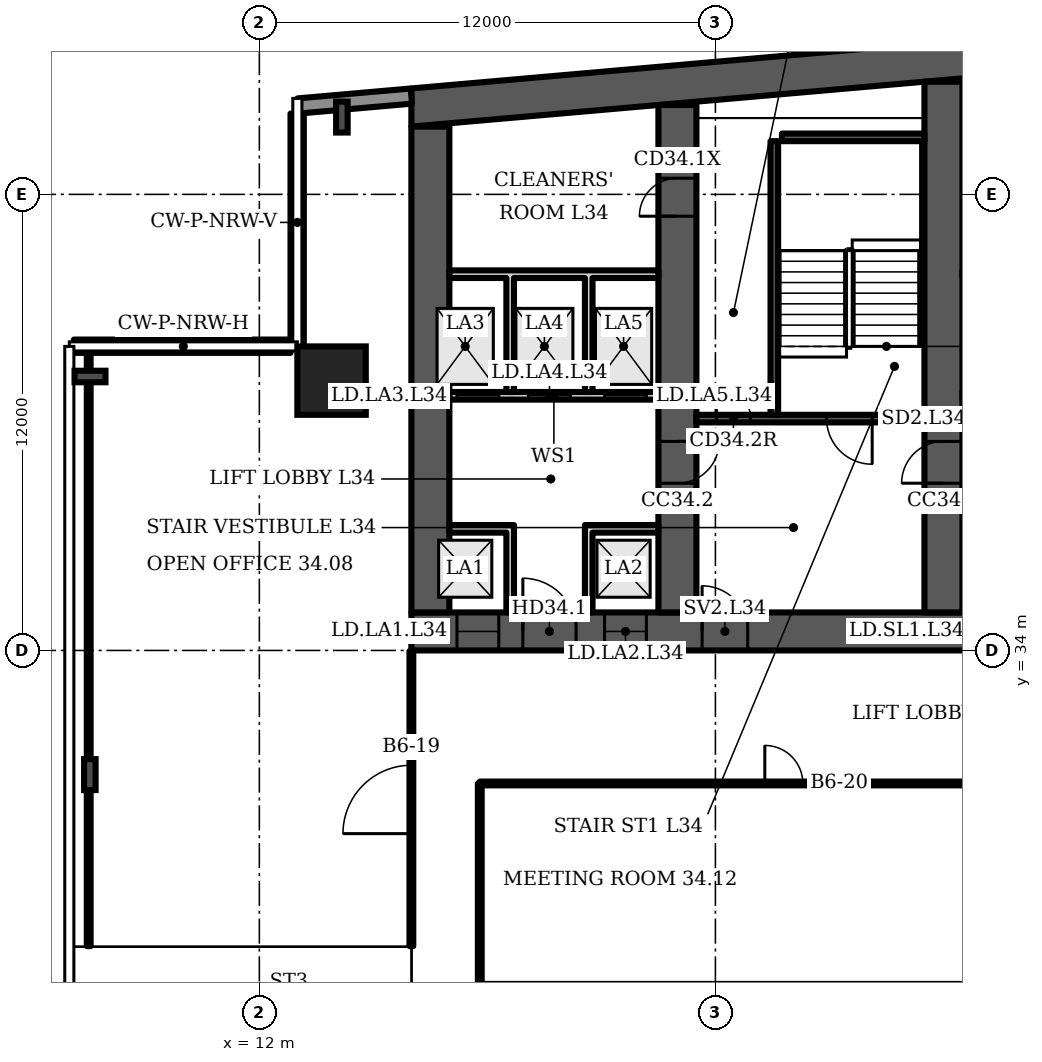
"""IFC4 building model, lengths in metres.
Left out: names, types, materials, properties, quantities, classifications, styles, units other than length and angle.
Written with IfcOpenShell. Run it as: python <this file> out.ifc"""

import sys

from ifc_helpers import new_model, si_unit, direction, frame, frame_2d, origin, origin_2d, place, context, subcontext, project, spatial, polyline, rectangle, i_section, outline, extrude, element, fill, save


model = new_model("IFC4")
c1 = context("Model", 3, precision=1e-05, world=origin(), true_north=direction((0.0, 1.0)))
c2 = subcontext(c1, "Body", "Model", "MODEL_VIEW")
j1 = project(units=[si_unit("LENGTHUNIT", "METRE"), si_unit("PLANEANGLEUNIT", "RADIAN")], contexts=[c1])
p1 = place(None, origin())
s1 = spatial("IfcSite", under=j1, at=p1, CompositionType="ELEMENT")
p2 = place(p1, origin())
s2 = spatial("IfcBuilding", under=s1, at=p2, CompositionType="ELEMENT")
p3 = place(p2, frame((0.0, 0.0, 143.5)))
s3 = spatial("IfcBuildingStorey", under=s2, at=p3, CompositionType="ELEMENT", Elevation=143.5)
p4 = place(p3, origin())
e1 = element("IfcWall", 1, at=p4, inside=s3, PredefinedType="SHEAR", context=c2, shape_type="SweptSolid", body=[
    extrude(outline(polyline([(16.0, 47.784), (40.5, 49.927), (65.0, 47.784), (65.0, 48.787), (40.5, 50.931), (16.0, 48.787), (16.0, 47.784)])), origin(), (0.0, 0.0, 1.0), 3.6),
])
p5 = place(p3, frame((16.0, 34.5, 0.0), z_axis=(0.0, 0.0, 1.0), x_axis=(1.0, 0.0, 0.0)))
e2 = element("IfcWall", 2, at=p5, inside=s3, PredefinedType="SHEAR", context=c2, shape_type="SweptSolid", body=[
    extrude(rectangle(XDim=49.0, YDim=1.0, at=frame_2d((24.5, 0.0))), origin(), (0.0, 0.0, 1.0), 3.6),
])
p6 = place(p5, frame((1.2, 0.0, 0.0)))
e3 = element("IfcOpeningElement", 3, at=p6, cuts=e2, PredefinedType="OPENING", context=c2, shape_type="SweptSolid", body=[
    extrude(rectangle(XDim=1.1, YDim=2.1, at=frame_2d((0.55, 1.05))), frame((0.0, 0.51, 0.0), z_axis=(0.0, -1.0, 0.0), x_axis=(1.0, 0.0, 0.0)), (0.0, 0.0, 1.0), 1.02),
])
p7 = place(p5, frame((5.083, 0.0, 0.0)))
e4 = element("IfcOpeningElement", 4, at=p7, cuts=e2, PredefinedType="OPENING", context=c2, shape_type="SweptSolid", body=[
    extrude(rectangle(XDim=1.1, YDim=2.1, at=frame_2d((0.55, 1.05))), frame((0.0, 0.51, 0.0), z_axis=(0.0, -1.0, 0.0), x_axis=(1.0, 0.0, 0.0)), (0.0, 0.0, 1.0), 1.02),
])
p8 = place(p5, frame((2.933, 0.0, 0.0)))
e5 = element("IfcOpeningElement", 5, at=p8, cuts=e2, PredefinedType="OPENING", context=c2, shape_type="SweptSolid", body=[
    extrude(rectangle(XDim=1.4, YDim=2.1, at=frame_2d((0.7, 1.05))), frame((0.0, 0.51, 0.0), z_axis=(0.0, -1.0, 0.0), x_axis=(1.0, 0.0, 0.0)), (0.0, 0.0, 1.0), 1.02),
])
p9 = place(p5, frame((7.65, 0.0, 0.0)))
e6 = element("IfcOpeningElement", 6, at=p9, cuts=e2, PredefinedType="OPENING", context=c2, shape_type="SweptSolid", body=[
    extrude(rectangle(XDim=1.2, YDim=2.1, at=frame_2d((0.6, 1.05))), frame((0.0, 0.51, 0.0), z_axis=(0.0, -1.0, 0.0), x_axis=(1.0, 0.0, 0.0)), (0.0, 0.0, 1.0), 1.02),
])
p10 = place(p5, frame((14.817, 0.0, 0.0)))
e7 = element("IfcOpeningElement", 7, at=p10, cuts=e2, PredefinedType="OPENING", context=c2, shape_type="SweptSolid", body=[
    extrude(rectangle(XDim=1.1, YDim=2.1, at=frame_2d((0.55, 1.05))), frame((0.0, 0.51, 0.0), z_axis=(0.0, -1.0, 0.0), x_axis=(1.0, 0.0, 0.0)), (0.0, 0.0, 1.0), 1.02),
])
p11 = place(p5, frame((19.083, 0.0, 0.0)))
e8 = element("IfcOpeningElement", 8, at=p11, cuts=e2, PredefinedType="OPENING", context=c2, shape_type="SweptSolid", body=[
    extrude(rectangle(XDim=1.1, YDim=2.1, at=frame_2d((0.55, 1.05))), frame((0.0, 0.51, 0.0), z_axis=(0.0, -1.0, 0.0), x_axis=(1.0, 0.0, 0.0)), (0.0, 0.0, 1.0), 1.02),
])
p12 = place(p5, frame((16.8, 0.0, 0.0)))
e9 = element("IfcOpeningElement", 9, at=p12, cuts=e2, PredefinedType="OPENING", context=c2, shape_type="SweptSolid", body=[
    extrude(rectangle(XDim=1.4, YDim=2.1, at=frame_2d((0.7, 1.05))), frame((0.0, 0.51, 0.0), z_axis=(0.0, -1.0, 0.0), x_axis=(1.0, 0.0, 0.0)), (0.0, 0.0, 1.0), 1.02),
])
p13 = place(p5, frame((21.817, 0.0, 0.0)))
e10 = element("IfcOpeningElement", 10, at=p13, cuts=e2, PredefinedType="OPENING", context=c2, shape_type="SweptSolid", body=[
    extrude(rectangle(XDim=1.1, YDim=2.1, at=frame_2d((0.55, 1.05))), frame((0.0, 0.51, 0.0), z_axis=(0.0, -1.0, 0.0), x_axis=(1.0, 0.0, 0.0)), (0.0, 0.0, 1.0), 1.02),
])
p14 = place(p5, frame((26.083, 0.0, 0.0)))
e11 = element("IfcOpeningElement", 11, at=p14, cuts=e2, PredefinedType="OPENING", context=c2, shape_type="SweptSolid", body=[
    extrude(rectangle(XDim=1.1, YDim=2.1, at=frame_2d((0.55, 1.05))), frame((0.0, 0.51, 0.0), z_axis=(0.0, -1.0, 0.0), x_axis=(1.0, 0.0, 0.0)), (0.0, 0.0, 1.0), 1.02),
])
p15 = place(p5, frame((33.15, 0.0, 0.0)))
e12 = element("IfcOpeningElement", 12, at=p15, cuts=e2, PredefinedType="OPENING", context=c2, shape_type="SweptSolid", body=[
    extrude(rectangle(XDim=1.2, YDim=2.1, at=frame_2d((0.6, 1.05))), frame((0.0, 0.51, 0.0), z_axis=(0.0, -1.0, 0.0), x_axis=(1.0, 0.0, 0.0)), (0.0, 0.0, 1.0), 1.02),
])
p16 = place(p5, frame((37.8, 0.0, 0.0)))
e13 = element("IfcOpeningElement", 13, at=p16, cuts=e2, PredefinedType="OPENING", context=c2, shape_type="SweptSolid", body=[
    extrude(rectangle(XDim=1.4, YDim=2.1, at=frame_2d((0.7, 1.05))), frame((0.0, 0.51, 0.0), z_axis=(0.0, -1.0, 0.0), x_axis=(1.0, 0.0, 0.0)), (0.0, 0.0, 1.0), 1.02),
])
p17 = place(p5, frame((42.817, 0.0, 0.0)))
e14 = element("IfcOpeningElement", 14, at=p17, cuts=e2, PredefinedType="OPENING", context=c2, shape_type="SweptSolid", body=[
    extrude(rectangle(XDim=1.1, YDim=2.1, at=frame_2d((0.55, 1.05))), frame((0.0, 0.51, 0.0), z_axis=(0.0, -1.0, 0.0), x_axis=(1.0, 0.0, 0.0)), (0.0, 0.0, 1.0), 1.02),
])
p18 = place(p5, frame((46.7, 0.0, 0.0)))
e15 = element("IfcOpeningElement", 15, at=p18, cuts=e2, PredefinedType="OPENING", context=c2, shape_type="SweptSolid", body=[
    extrude(rectangle(XDim=1.1, YDim=2.1, at=frame_2d((0.55, 1.05))), frame((0.0, 0.51, 0.0), z_axis=(0.0, -1.0, 0.0), x_axis=(1.0, 0.0, 0.0)), (0.0, 0.0, 1.0), 1.02),
])
p19 = place(p5, frame((44.667, 0.0, 0.0)))
e16 = element("IfcOpeningElement", 16, at=p19, cuts=e2, PredefinedType="OPENING", context=c2, shape_type="SweptSolid", body=[
    extrude(rectangle(XDim=1.4, YDim=2.1, at=frame_2d((0.7, 1.05))), frame((0.0, 0.51, 0.0), z_axis=(0.0, -1.0, 0.0), x_axis=(1.0, 0.0, 0.0)), (0.0, 0.0, 1.0), 1.02),
])
p20 = place(p3, frame((16.5, 35.0, 0.0), z_axis=(0.0, 0.0, 1.0), x_axis=(0.0, 1.0, 0.0)))
e17 = element("IfcWall", 17, at=p20, inside=s3, PredefinedType="SHEAR", context=c2, shape_type="SweptSolid", body=[
    extrude(rectangle(XDim=12.784, YDim=1.0, at=frame_2d((6.392, 0.0))), origin(), (0.0, 0.0, 1.0), 3.6),
])
p21 = place(p3, frame((23.0, 35.0, 0.0), z_axis=(0.0, 0.0, 1.0), x_axis=(0.0, 1.0, 0.0)))
e18 = element("IfcWall", 18, at=p21, inside=s3, PredefinedType="SHEAR", context=c2, shape_type="SweptSolid", body=[
    extrude(rectangle(XDim=13.352, YDim=1.0, at=frame_2d((6.676, 0.0))), origin(), (0.0, 0.0, 1.0), 3.6),
])
p22 = place(p21, frame((10.426, 0.0, 0.0)))
e19 = element("IfcOpeningElement", 19, at=p22, cuts=e18, PredefinedType="OPENING", context=c2, shape_type="SweptSolid", body=[
    extrude(rectangle(XDim=1.0, YDim=2.1, at=frame_2d((0.5, 1.05))), frame((0.0, 0.51, 0.0), z_axis=(0.0, -1.0, 0.0), x_axis=(1.0, 0.0, 0.0)), (0.0, 0.0, 1.0), 1.02),
])
p23 = place(p21, frame((3.4, 0.0, 0.0)))
e20 = element("IfcOpeningElement", 20, at=p23, cuts=e18, PredefinedType="OPENING", context=c2, shape_type="SweptSolid", body=[
    extrude(rectangle(XDim=1.1, YDim=2.1, at=frame_2d((0.55, 1.05))), frame((0.0, 0.51, 0.0), z_axis=(0.0, -1.0, 0.0), x_axis=(1.0, 0.0, 0.0)), (0.0, 0.0, 1.0), 1.02),
])
p24 = place(p3, frame((30.0, 35.0, 0.0), z_axis=(0.0, 0.0, 1.0), x_axis=(0.0, 1.0, 0.0)))
e21 = element("IfcWall", 21, at=p24, inside=s3, PredefinedType="SHEAR", context=c2, shape_type="SweptSolid", body=[
    extrude(rectangle(XDim=13.965, YDim=1.0, at=frame_2d((6.982, 0.0))), origin(), (0.0, 0.0, 1.0), 3.6),
])
p25 = place(p24, frame((3.4, 0.0, 0.0)))
e22 = element("IfcOpeningElement", 22, at=p25, cuts=e21, PredefinedType="OPENING", context=c2, shape_type="SweptSolid", body=[
    extrude(rectangle(XDim=1.1, YDim=2.1, at=frame_2d((0.55, 1.05))), frame((0.0, 0.51, 0.0), z_axis=(0.0, -1.0, 0.0), x_axis=(1.0, 0.0, 0.0)), (0.0, 0.0, 1.0), 1.02),
])
p26 = place(p3, frame((13.9, 41.1, 0.0), z_axis=(0.0, 0.0, 1.0), x_axis=(1.0, 0.0, 0.0)))
e23 = element("IfcColumn", 23, at=p26, inside=s3, PredefinedType="COLUMN", context=c2, shape_type="SweptSolid", body=[
    extrude(rectangle(XDim=1.8, YDim=1.8, at=origin_2d()), origin(), (0.0, 0.0, 1.0), 3.6),
])
for number, where, z_axis, x_axis in (
    (24, (14.172, 48.034, 0.0), (0.0, 0.0, 1.0), (-1.0, 0.0, 0.0)),
    (25, (7.544, 41.208, 0.0), (0.0, 0.0, 1.0), (0.0, 1.0, 0.0)),
    (26, (7.54, 30.733, 0.0), (0.0, 0.0, 1.0), (-1.0, 0.0, 0.0)),
):
    element("IfcColumn", number, at=place(p3, frame(where, z_axis=z_axis, x_axis=x_axis)), inside=s3, PredefinedType="COLUMN", context=c2, shape_type="SweptSolid", body=[
        extrude(i_section(OverallWidth=0.303, OverallDepth=0.814, WebThickness=0.021, FlangeThickness=0.04, FilletRadius=0.03, at=origin_2d()), origin(), (0.0, 0.0, 1.0), 3.6),
    ])
p27 = place(p3, frame((16.0, 48.587, 0.0), z_axis=(0.0, 0.0, 1.0), x_axis=(-0.996194, -0.087168, 0.0)))
e27 = element("IfcWall", 27, at=p27, inside=s3, PredefinedType="SOLIDWALL", context=c2, shape_type="SweptSolid", body=[
    extrude(rectangle(XDim=2.994, YDim=0.4, at=frame_2d((1.497, 0.0))), origin(), (0.0, 0.0, 1.0), 3.15),
])
p28 = place(p3, frame((12.995, 48.126, 0.0), z_axis=(0.0, 0.0, 1.0), x_axis=(0.0, -1.0, 0.0)))
e28 = element("IfcWall", 28, at=p28, inside=s3, PredefinedType="SOLIDWALL", context=c2, shape_type="SweptSolid", body=[
    extrude(rectangle(XDim=6.126, YDim=0.35, at=frame_2d((3.063, 0.0))), origin(), (0.0, 0.0, 1.0), 1.0),
])
p29 = place(p3, frame((12.82, 42.005, 0.0), z_axis=(0.0, 0.0, 1.0), x_axis=(-1.0, 0.0, 0.0)))
e29 = element("IfcWall", 29, at=p29, inside=s3, PredefinedType="SOLIDWALL", context=c2, shape_type="SweptSolid", body=[
    extrude(rectangle(XDim=5.7, YDim=0.35, at=frame_2d((2.85, 0.0))), origin(), (0.0, 0.0, 1.0), 1.0),
])
p30 = place(p3, frame((17.0, 40.7, 0.0), z_axis=(0.0, 0.0, 1.0), x_axis=(1.0, 0.0, 0.0)))
e30 = element("IfcWall", 30, at=p30, inside=s3, PredefinedType="PARTITIONING", context=c2, shape_type="SweptSolid", body=[
    extrude(rectangle(XDim=5.5, YDim=0.2, at=frame_2d((2.75, 0.0))), origin(), (0.0, 0.0, 1.0), 3.15),
])
p31 = place(p30, frame((0.2, 0.0, 0.0)))
e31 = element("IfcOpeningElement", 31, at=p31, cuts=e30, PredefinedType="OPENING", context=c2, shape_type="SweptSolid", body=[
    extrude(rectangle(XDim=1.1, YDim=2.1, at=frame_2d((0.55, 1.05))), frame((0.0, 0.11, 0.0), z_axis=(0.0, -1.0, 0.0), x_axis=(1.0, 0.0, 0.0)), (0.0, 0.0, 1.0), 0.22),
])
p32 = place(p30, frame((2.083, 0.0, 0.0)))
e32 = element("IfcOpeningElement", 32, at=p32, cuts=e30, PredefinedType="OPENING", context=c2, shape_type="SweptSolid", body=[
    extrude(rectangle(XDim=1.1, YDim=2.1, at=frame_2d((0.55, 1.05))), frame((0.0, 0.11, 0.0), z_axis=(0.0, -1.0, 0.0), x_axis=(1.0, 0.0, 0.0)), (0.0, 0.0, 1.0), 0.22),
])
p33 = place(p30, frame((4.083, 0.0, 0.0)))
e33 = element("IfcOpeningElement", 33, at=p33, cuts=e30, PredefinedType="OPENING", context=c2, shape_type="SweptSolid", body=[
    extrude(rectangle(XDim=1.1, YDim=2.1, at=frame_2d((0.55, 1.05))), frame((0.0, 0.11, 0.0), z_axis=(0.0, -1.0, 0.0), x_axis=(1.0, 0.0, 0.0)), (0.0, 0.0, 1.0), 0.22),
])
p34 = place(p3, frame((0.0, 0.0, -0.0)))
e34 = element("IfcWall", 34, at=p34, inside=s3, PredefinedType="PARTITIONING", context=c2, shape_type="SweptSolid", body=[
    extrude(outline(polyline([(18.5, 37.1), (17.0, 37.1), (17.0, 37.3), (18.5, 37.3), (18.7, 37.3), (18.7, 35.0), (18.5, 35.0), (18.5, 37.1)])), origin(), (0.0, 0.0, 1.0), 3.15),
])
p35 = place(p3, frame((0.0, 0.0, -0.0)))
e35 = element("IfcWall", 35, at=p35, inside=s3, PredefinedType="PARTITIONING", context=c2, shape_type="SweptSolid", body=[
    extrude(outline(polyline([(20.567, 37.3), (20.767, 37.3), (22.5, 37.3), (22.5, 37.1), (20.767, 37.1), (20.767, 35.0), (20.567, 35.0), (20.567, 37.3)])), origin(), (0.0, 0.0, 1.0), 3.15),
])
p36 = place(p3, frame((0.0, 0.0, -0.0)))
e36 = element("IfcWall", 36, at=p36, inside=s3, PredefinedType="PARTITIONING", context=c2, shape_type="SweptSolid", body=[
    extrude(outline(polyline([(18.7, 40.8), (18.5, 40.8), (18.5, 43.8), (17.0, 43.8), (17.0, 44.0), (22.5, 44.0), (22.5, 43.8), (20.767, 43.8), (20.767, 40.8), (20.567, 40.8), (20.567, 43.8), (18.7, 43.8), (18.7, 40.8)])), origin(), (0.0, 0.0, 1.0), 3.15),
])
p37 = place(p3, frame((23.5, 40.1, 0.0), z_axis=(0.0, 0.0, 1.0), x_axis=(1.0, 0.0, 0.0)))
e37 = element("IfcWall", 37, at=p37, inside=s3, PredefinedType="SHEAR", context=c2, shape_type="SweptSolid", body=[
    extrude(rectangle(XDim=6.0, YDim=0.2, at=frame_2d((3.0, 0.0))), origin(), (0.0, 0.0, 1.0), 3.15),
])
p38 = place(p37, frame((3.425, 0.0, 0.0)))
e38 = element("IfcOpeningElement", 38, at=p38, cuts=e37, PredefinedType="OPENING", context=c2, shape_type="SweptSolid", body=[
    extrude(rectangle(XDim=1.2, YDim=2.1, at=frame_2d((0.6, 1.05))), frame((0.0, 0.11, 0.0), z_axis=(0.0, -1.0, 0.0), x_axis=(1.0, 0.0, 0.0)), (0.0, 0.0, 1.0), 0.22),
])
p39 = place(p37, frame((0.525, 0.0, 0.0)))
e39 = element("IfcOpeningElement", 39, at=p39, cuts=e37, PredefinedType="OPENING", context=c2, shape_type="SweptSolid", body=[
    extrude(rectangle(XDim=0.9, YDim=2.1, at=frame_2d((0.45, 1.05))), frame((0.0, 0.11, 0.0), z_axis=(0.0, -1.0, 0.0), x_axis=(1.0, 0.0, 0.0)), (0.0, 0.0, 1.0), 0.22),
])
p40 = place(p3, frame((25.55, 40.2, 0.0), z_axis=(0.0, 0.0, 1.0), x_axis=(0.0, 1.0, 0.0)))
e40 = element("IfcWall", 40, at=p40, inside=s3, PredefinedType="SHEAR", context=c2, shape_type="SweptSolid", body=[
    extrude(rectangle(XDim=7.2, YDim=0.2, at=frame_2d((3.6, 0.0))), origin(), (0.0, 0.0, 1.0), 3.15),
])
p41 = place(p3, frame((25.75, 47.5, 0.0), z_axis=(0.0, 0.0, 1.0), x_axis=(1.0, 0.0, 0.0)))
e41 = element("IfcWall", 41, at=p41, inside=s3, PredefinedType="SHEAR", context=c2, shape_type="SweptSolid", body=[
    extrude(rectangle(XDim=3.75, YDim=0.2, at=frame_2d((1.875, 0.0))), origin(), (0.0, 0.0, 1.0), 3.15),
])
p42 = place(p3, frame((7.51, 26.22, 0.0), z_axis=(0.0, 0.0, 1.0), x_axis=(0.0, 1.0, 0.0)))
e42 = element("IfcWall", 42, at=p42, inside=s3, PredefinedType="PARTITIONING", context=c2, shape_type="SweptSolid", body=[
    extrude(rectangle(XDim=15.76, YDim=0.1, at=frame_2d((7.88, 0.0))), origin(), (0.0, 0.0, 1.0), 2.53),
])
p43 = place(p3, frame((16.0, 26.22, 0.0), z_axis=(0.0, 0.0, 1.0), x_axis=(0.0, 1.0, 0.0)))
e43 = element("IfcWall", 43, at=p43, inside=s3, PredefinedType="PARTITIONING", context=c2, shape_type="SweptSolid", body=[
    extrude(rectangle(XDim=7.76, YDim=0.1, at=frame_2d((3.88, 0.0))), origin(), (0.0, 0.0, 1.0), 3.15),
])
p44 = place(p43, frame((2.96, 0.0, 0.0)))
e44 = element("IfcOpeningElement", 44, at=p44, cuts=e43, PredefinedType="OPENING", context=c2, shape_type="SweptSolid", body=[
    extrude(rectangle(XDim=1.8, YDim=2.1, at=frame_2d((0.9, 1.05))), frame((0.0, 0.06, 0.0), z_axis=(0.0, -1.0, 0.0), x_axis=(1.0, 0.0, 0.0)), (0.0, 0.0, 1.0), 0.12),
])
p45 = place(p3, frame((17.8, 23.935, 0.0), z_axis=(0.0, 0.0, 1.0), x_axis=(0.0, 1.0, 0.0)))
e45 = element("IfcWall", 45, at=p45, inside=s3, PredefinedType="PARTITIONING", context=c2, shape_type="SweptSolid", body=[
    extrude(rectangle(XDim=6.565, YDim=0.1, at=frame_2d((3.282, 0.0))), origin(), (0.0, 0.0, 1.0), 3.15),
])
p46 = place(p3, frame((17.8, 30.5, 0.0), z_axis=(0.0, 0.0, 1.0), x_axis=(1.0, 0.0, 0.0)))
e46 = element("IfcWall", 46, at=p46, inside=s3, PredefinedType="PARTITIONING", context=c2, shape_type="SweptSolid", body=[
    extrude(rectangle(XDim=19.05, YDim=0.1, at=frame_2d((9.525, 0.0))), origin(), (0.0, 0.0, 1.0), 3.15),
])
p47 = place(p46, frame((7.5, 0.0, 0.0)))
e47 = element("IfcOpeningElement", 47, at=p47, cuts=e46, PredefinedType="OPENING", context=c2, shape_type="SweptSolid", body=[
    extrude(rectangle(XDim=1.0, YDim=2.1, at=frame_2d((0.5, 1.05))), frame((0.0, 0.06, 0.0), z_axis=(0.0, -1.0, 0.0), x_axis=(1.0, 0.0, 0.0)), (0.0, 0.0, 1.0), 0.12),
])
p48 = place(p6, origin())
e48 = element("IfcDoor", 48, at=p48, inside=s3, OperationType="DOUBLE_DOOR_SLIDING", PredefinedType="DOOR", context=c2, shape_type="SweptSolid", body=[
    extrude(rectangle(XDim=1.1, YDim=2.1, at=frame_2d((0.55, 1.05))), frame((0.0, 0.025, 0.0), z_axis=(0.0, -1.0, 0.0), x_axis=(1.0, 0.0, 0.0)), (0.0, 0.0, 1.0), 0.05),
])
fill(e3, e48)
p49 = place(p7, origin())
e49 = element("IfcDoor", 49, at=p49, inside=s3, OperationType="DOUBLE_DOOR_SLIDING", PredefinedType="DOOR", context=c2, shape_type="SweptSolid", body=[
    extrude(rectangle(XDim=1.1, YDim=2.1, at=frame_2d((0.55, 1.05))), frame((0.0, 0.025, 0.0), z_axis=(0.0, -1.0, 0.0), x_axis=(1.0, 0.0, 0.0)), (0.0, 0.0, 1.0), 0.05),
])
fill(e4, e49)
p50 = place(p8, origin())
e50 = element("IfcDoor", 50, at=p50, inside=s3, OperationType="DOUBLE_DOOR_SINGLE_SWING", PredefinedType="DOOR", context=c2, shape_type="SweptSolid", body=[
    extrude(rectangle(XDim=1.4, YDim=2.1, at=frame_2d((0.7, 1.05))), frame((0.0, 0.025, 0.0), z_axis=(0.0, -1.0, 0.0), x_axis=(1.0, 0.0, 0.0)), (0.0, 0.0, 1.0), 0.05),
])
fill(e5, e50)
p51 = place(p31, origin())
e51 = element("IfcDoor", 51, at=p51, inside=s3, OperationType="DOUBLE_DOOR_SLIDING", PredefinedType="DOOR", context=c2, shape_type="SweptSolid", body=[
    extrude(rectangle(XDim=1.1, YDim=2.1, at=frame_2d((0.55, 1.05))), frame((0.0, 0.025, 0.0), z_axis=(0.0, -1.0, 0.0), x_axis=(1.0, 0.0, 0.0)), (0.0, 0.0, 1.0), 0.05),
])
fill(e31, e51)
p52 = place(p32, origin())
e52 = element("IfcDoor", 52, at=p52, inside=s3, OperationType="DOUBLE_DOOR_SLIDING", PredefinedType="DOOR", context=c2, shape_type="SweptSolid", body=[
    extrude(rectangle(XDim=1.1, YDim=2.1, at=frame_2d((0.55, 1.05))), frame((0.0, 0.025, 0.0), z_axis=(0.0, -1.0, 0.0), x_axis=(1.0, 0.0, 0.0)), (0.0, 0.0, 1.0), 0.05),
])
fill(e32, e52)
p53 = place(p33, origin())
e53 = element("IfcDoor", 53, at=p53, inside=s3, OperationType="DOUBLE_DOOR_SLIDING", PredefinedType="DOOR", context=c2, shape_type="SweptSolid", body=[
    extrude(rectangle(XDim=1.1, YDim=2.1, at=frame_2d((0.55, 1.05))), frame((0.0, 0.025, 0.0), z_axis=(0.0, -1.0, 0.0), x_axis=(1.0, 0.0, 0.0)), (0.0, 0.0, 1.0), 0.05),
])
fill(e33, e53)
p54 = place(p22, origin())
e54 = element("IfcDoor", 54, at=p54, inside=s3, OperationType="SINGLE_SWING_LEFT", PredefinedType="DOOR", context=c2, shape_type="SweptSolid", body=[
    extrude(rectangle(XDim=1.0, YDim=2.1, at=frame_2d((0.5, 1.05))), frame((0.0, 0.5, 0.0), z_axis=(0.0, -1.0, 0.0), x_axis=(1.0, 0.0, 0.0)), (0.0, 0.0, 1.0), 1.0),
])
fill(e19, e54)
p55 = place(p38, origin())
e55 = element("IfcDoor", 55, at=p55, inside=s3, OperationType="SINGLE_SWING_RIGHT", PredefinedType="DOOR", context=c2, shape_type="SweptSolid", body=[
    extrude(rectangle(XDim=1.2, YDim=2.1, at=frame_2d((0.6, 1.05))), frame((0.0, 0.025, 0.0), z_axis=(0.0, -1.0, 0.0), x_axis=(1.0, 0.0, 0.0)), (0.0, 0.0, 1.0), 0.05),
])
fill(e38, e55)
p56 = place(p39, origin())
e56 = element("IfcDoor", 56, at=p56, inside=s3, OperationType="SINGLE_SWING_LEFT", PredefinedType="DOOR", context=c2, shape_type="SweptSolid", body=[
    extrude(rectangle(XDim=0.9, YDim=2.1, at=frame_2d((0.45, 1.05))), frame((0.0, 0.025, 0.0), z_axis=(0.0, -1.0, 0.0), x_axis=(1.0, 0.0, 0.0)), (0.0, 0.0, 1.0), 0.05),
])
fill(e39, e56)
p57 = place(p9, origin())
e57 = element("IfcDoor", 57, at=p57, inside=s3, OperationType="SINGLE_SWING_LEFT", PredefinedType="DOOR", context=c2, shape_type="SweptSolid", body=[
    extrude(rectangle(XDim=1.2, YDim=2.1, at=frame_2d((0.6, 1.05))), frame((0.0, 0.025, 0.0), z_axis=(0.0, -1.0, 0.0), x_axis=(1.0, 0.0, 0.0)), (0.0, 0.0, 1.0), 0.05),
])
fill(e6, e57)
p58 = place(p23, origin())
e58 = element("IfcDoor", 58, at=p58, inside=s3, OperationType="SINGLE_SWING_RIGHT", PredefinedType="DOOR", context=c2, shape_type="SweptSolid", body=[
    extrude(rectangle(XDim=1.1, YDim=2.1, at=frame_2d((0.55, 1.05))), frame((0.0, 0.025, 0.0), z_axis=(0.0, -1.0, 0.0), x_axis=(1.0, 0.0, 0.0)), (0.0, 0.0, 1.0), 0.05),
])
fill(e20, e58)
p59 = place(p25, origin())
e59 = element("IfcDoor", 59, at=p59, inside=s3, OperationType="SINGLE_SWING_LEFT", PredefinedType="DOOR", context=c2, shape_type="SweptSolid", body=[
    extrude(rectangle(XDim=1.1, YDim=2.1, at=frame_2d((0.55, 1.05))), frame((0.0, 0.025, 0.0), z_axis=(0.0, -1.0, 0.0), x_axis=(1.0, 0.0, 0.0)), (0.0, 0.0, 1.0), 0.05),
])
fill(e22, e59)
p60 = place(p44, origin())
e60 = element("IfcDoor", 60, at=p60, inside=s3, OperationType="DOUBLE_DOOR_SINGLE_SWING", PredefinedType="DOOR", context=c2, shape_type="SweptSolid", body=[
    extrude(rectangle(XDim=1.8, YDim=2.1, at=frame_2d((0.9, 1.05))), frame((0.0, 0.025, 0.0), z_axis=(0.0, -1.0, 0.0), x_axis=(1.0, 0.0, 0.0)), (0.0, 0.0, 1.0), 0.05),
])
fill(e44, e60)
p61 = place(p47, origin())
e61 = element("IfcDoor", 61, at=p61, inside=s3, OperationType="SINGLE_SWING_LEFT", PredefinedType="DOOR", context=c2, shape_type="SweptSolid", body=[
    extrude(rectangle(XDim=1.0, YDim=2.1, at=frame_2d((0.5, 1.05))), frame((0.0, 0.025, 0.0), z_axis=(0.0, -1.0, 0.0), x_axis=(1.0, 0.0, 0.0)), (0.0, 0.0, 1.0), 0.05),
])
fill(e47, e61)
save(model, sys.argv[1])
